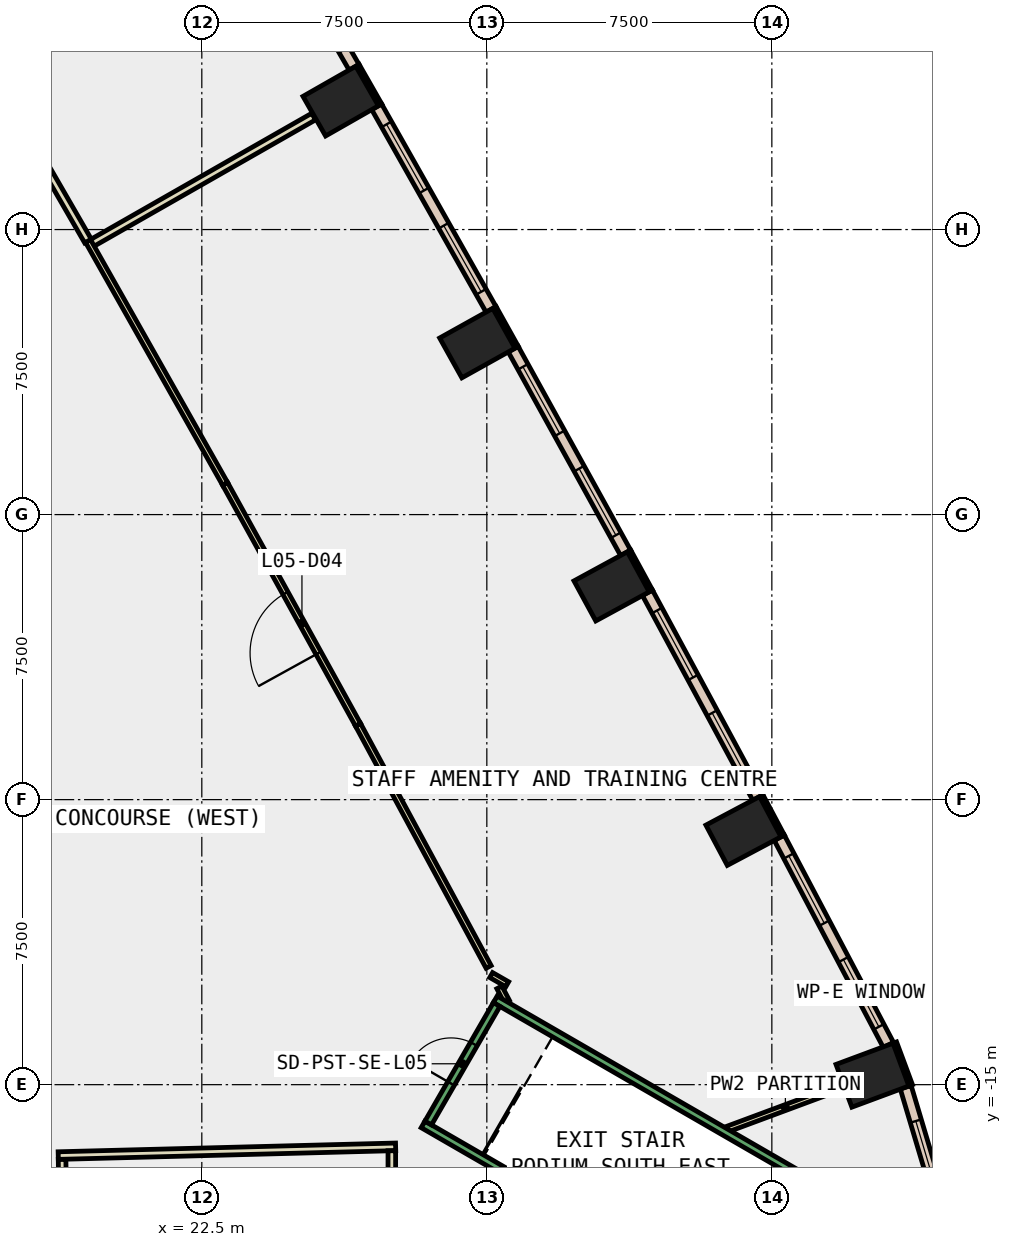
"""IFC4 building model, lengths in metres.
Left out: names, types, materials, properties, quantities, classifications, styles, units other than length and angle.
Written with IfcOpenShell. Run it as: python <this file> out.ifc"""

import sys

from ifc_helpers import new_model, si_unit, direction, frame, frame_2d, origin, origin_2d, place, context, subcontext, project, spatial, rectangle, extrude, element, fill, save


model = new_model("IFC4")
c1 = context("Model", 3, precision=1e-05, world=origin(), true_north=direction((0.0, 1.0)))
c2 = subcontext(c1, "Body", "Model", "MODEL_VIEW")
j1 = project(units=[si_unit("LENGTHUNIT", "METRE"), si_unit("PLANEANGLEUNIT", "RADIAN")], contexts=[c1])
p1 = place(None, origin())
s1 = spatial("IfcSite", under=j1, at=p1, CompositionType="ELEMENT")
p2 = place(p1, origin())
s2 = spatial("IfcBuilding", under=s1, at=p2, CompositionType="ELEMENT")
p3 = place(p2, frame((0.0, 0.0, 30.0)))
s3 = spatial("IfcBuildingStorey", under=s2, at=p3, CompositionType="ELEMENT", Elevation=30.0)
for number, where, z_axis, x_axis in (
    (1, (40.147, -14.751, -0.45), (0.0, 0.0, 1.0), (-0.348, 0.937, 0.0)),
    (2, (36.753, -8.325, -0.45), (0.0, 0.0, 1.0), (-0.469, 0.883, 0.0)),
    (3, (33.283, -1.889, -0.45), (0.0, 0.0, 1.0), (-0.478, 0.878, 0.0)),
    (4, (29.75, 4.512, -0.45), (0.0, 0.0, 1.0), (-0.487, 0.873, 0.0)),
    (5, (26.155, 10.88, -0.45), (0.0, 0.0, 1.0), (-0.496, 0.869, 0.0)),
):
    element("IfcColumn", number, at=place(p3, frame(where, z_axis=z_axis, x_axis=x_axis)), inside=s3, PredefinedType="COLUMN", context=c2, shape_type="SweptSolid", body=[
        extrude(rectangle(XDim=1.2, YDim=1.6, at=origin_2d()), origin(), (0.0, 0.0, 1.0), 4.85),
    ])
p4 = place(p3, frame((41.153, -15.018, 0.0), z_axis=(0.0, 0.0, 1.0), x_axis=(-0.348268249601, 0.937394914814, 0.0)))
e6 = element("IfcWall", 6, at=p4, inside=s3, PredefinedType="STANDARD", context=c2, shape_type="SweptSolid", body=[
    extrude(rectangle(XDim=1.2, YDim=0.1, at=frame_2d((0.6, 0.0))), origin(), (0.0, 0.0, 1.0), 4.4),
])
p5 = place(p3, frame((37.785, -8.456, 0.0), z_axis=(0.0, 0.0, 1.0), x_axis=(-0.469383408131, 0.882994459876, 0.0)))
e7 = element("IfcWall", 7, at=p5, inside=s3, PredefinedType="STANDARD", context=c2, shape_type="SweptSolid", body=[
    extrude(rectangle(XDim=1.199, YDim=0.1, at=frame_2d((0.6, 0.0))), origin(), (0.0, 0.0, 1.0), 4.4),
])
p6 = place(p3, frame((34.316, -2.01, 0.0), z_axis=(0.0, 0.0, 1.0), x_axis=(-0.478267644701, 0.878214131082, 0.0)))
e8 = element("IfcWall", 8, at=p6, inside=s3, PredefinedType="STANDARD", context=c2, shape_type="SweptSolid", body=[
    extrude(rectangle(XDim=1.2, YDim=0.1, at=frame_2d((0.6, 0.0))), origin(), (0.0, 0.0, 1.0), 4.4),
])
p7 = place(p3, frame((30.784, 4.402, 0.0), z_axis=(0.0, 0.0, 1.0), x_axis=(-0.486817526853, 0.873503689488, 0.0)))
e9 = element("IfcWall", 9, at=p7, inside=s3, PredefinedType="STANDARD", context=c2, shape_type="SweptSolid", body=[
    extrude(rectangle(XDim=1.2, YDim=0.1, at=frame_2d((0.6, 0.0))), origin(), (0.0, 0.0, 1.0), 4.4),
])
p8 = place(p3, frame((27.191, 10.78, 0.0), z_axis=(0.0, 0.0, 1.0), x_axis=(-0.495854054996, 0.868405870629, 0.0)))
e10 = element("IfcWall", 10, at=p8, inside=s3, PredefinedType="STANDARD", context=c2, shape_type="SweptSolid", body=[
    extrude(rectangle(XDim=1.2, YDim=0.1, at=frame_2d((0.6, 0.0))), origin(), (0.0, 0.0, 1.0), 4.4),
])
p9 = place(p3, frame((42.011, -18.382, 0.0), z_axis=(0.0, 0.0, 1.0), x_axis=(-0.285800575124, 0.958289116738, 0.0)))
e11 = element("IfcWall", 11, at=p9, inside=s3, PredefinedType="STANDARD", context=c2, shape_type="SweptSolid", body=[
    extrude(rectangle(XDim=3.46, YDim=0.3, at=frame_2d((1.73, 0.0))), origin(), (0.0, 0.0, 1.0), 4.4),
])
p10 = place(p9, frame((0.93, 0.0, 1.0)))
e12 = element("IfcOpeningElement", 12, at=p10, cuts=e11, PredefinedType="OPENING", context=c2, shape_type="SweptSolid", body=[
    extrude(rectangle(XDim=1.6, YDim=3.2, at=frame_2d((0.8, 1.6))), frame((0.0, 0.16, 0.0), z_axis=(0.0, -1.0, 0.0), x_axis=(1.0, 0.0, 0.0)), (0.0, 0.0, 1.0), 0.32),
])
p11 = place(p3, frame((40.568, -13.956, 0.0), z_axis=(0.0, 0.0, 1.0), x_axis=(-0.466125129602, 0.884718804792, 0.0)))
e13 = element("IfcWall", 13, at=p11, inside=s3, PredefinedType="STANDARD", context=c2, shape_type="SweptSolid", body=[
    extrude(rectangle(XDim=6.164, YDim=0.3, at=frame_2d((3.082, 0.0))), origin(), (0.0, 0.0, 1.0), 4.4),
])
p12 = place(p11, frame((0.541, 0.0, 1.0)))
e14 = element("IfcOpeningElement", 14, at=p12, cuts=e13, PredefinedType="OPENING", context=c2, shape_type="SweptSolid", body=[
    extrude(rectangle(XDim=2.0, YDim=3.2, at=frame_2d((1.0, 1.6))), frame((0.0, 0.16, 0.0), z_axis=(0.0, -1.0, 0.0), x_axis=(1.0, 0.0, 0.0)), (0.0, 0.0, 1.0), 0.32),
])
p13 = place(p11, frame((3.623, 0.0, 1.0)))
e15 = element("IfcOpeningElement", 15, at=p13, cuts=e13, PredefinedType="OPENING", context=c2, shape_type="SweptSolid", body=[
    extrude(rectangle(XDim=2.0, YDim=3.2, at=frame_2d((1.0, 1.6))), frame((0.0, 0.16, 0.0), z_axis=(0.0, -1.0, 0.0), x_axis=(1.0, 0.0, 0.0)), (0.0, 0.0, 1.0), 0.32),
])
p14 = place(p3, frame((37.131, -7.446, 0.0), z_axis=(0.0, 0.0, 1.0), x_axis=(-0.474584950749, 0.880209704856, 0.0)))
e16 = element("IfcWall", 16, at=p14, inside=s3, PredefinedType="STANDARD", context=c2, shape_type="SweptSolid", body=[
    extrude(rectangle(XDim=6.121, YDim=0.3, at=frame_2d((3.061, 0.0))), origin(), (0.0, 0.0, 1.0), 4.4),
])
p15 = place(p14, frame((0.53, 0.0, 1.0)))
e17 = element("IfcOpeningElement", 17, at=p15, cuts=e16, PredefinedType="OPENING", context=c2, shape_type="SweptSolid", body=[
    extrude(rectangle(XDim=2.0, YDim=3.2, at=frame_2d((1.0, 1.6))), frame((0.0, 0.16, 0.0), z_axis=(0.0, -1.0, 0.0), x_axis=(1.0, 0.0, 0.0)), (0.0, 0.0, 1.0), 0.32),
])
p16 = place(p14, frame((3.591, 0.0, 1.0)))
e18 = element("IfcOpeningElement", 18, at=p16, cuts=e16, PredefinedType="OPENING", context=c2, shape_type="SweptSolid", body=[
    extrude(rectangle(XDim=2.0, YDim=3.2, at=frame_2d((1.0, 1.6))), frame((0.0, 0.16, 0.0), z_axis=(0.0, -1.0, 0.0), x_axis=(1.0, 0.0, 0.0)), (0.0, 0.0, 1.0), 0.32),
])
p17 = place(p3, frame((33.652, -1.006, 0.0), z_axis=(0.0, 0.0, 1.0), x_axis=(-0.483233380559, 0.875491576152, 0.0)))
e19 = element("IfcWall", 19, at=p17, inside=s3, PredefinedType="STANDARD", context=c2, shape_type="SweptSolid", body=[
    extrude(rectangle(XDim=6.121, YDim=0.3, at=frame_2d((3.061, 0.0))), origin(), (0.0, 0.0, 1.0), 4.4),
])
p18 = place(p17, frame((0.53, 0.0, 1.0)))
e20 = element("IfcOpeningElement", 20, at=p18, cuts=e19, PredefinedType="OPENING", context=c2, shape_type="SweptSolid", body=[
    extrude(rectangle(XDim=2.0, YDim=3.2, at=frame_2d((1.0, 1.6))), frame((0.0, 0.16, 0.0), z_axis=(0.0, -1.0, 0.0), x_axis=(1.0, 0.0, 0.0)), (0.0, 0.0, 1.0), 0.32),
])
p19 = place(p17, frame((3.591, 0.0, 1.0)))
e21 = element("IfcOpeningElement", 21, at=p19, cuts=e19, PredefinedType="OPENING", context=c2, shape_type="SweptSolid", body=[
    extrude(rectangle(XDim=2.0, YDim=3.2, at=frame_2d((1.0, 1.6))), frame((0.0, 0.16, 0.0), z_axis=(0.0, -1.0, 0.0), x_axis=(1.0, 0.0, 0.0)), (0.0, 0.0, 1.0), 0.32),
])
p20 = place(p3, frame((30.111, 5.399, 0.0), z_axis=(0.0, 0.0, 1.0), x_axis=(-0.491661677717, 0.870786308267, 0.0)))
e22 = element("IfcWall", 22, at=p20, inside=s3, PredefinedType="STANDARD", context=c2, shape_type="SweptSolid", body=[
    extrude(rectangle(XDim=6.122, YDim=0.3, at=frame_2d((3.061, 0.0))), origin(), (0.0, 0.0, 1.0), 4.4),
])
p21 = place(p20, frame((0.531, 0.0, 1.0)))
e23 = element("IfcOpeningElement", 23, at=p21, cuts=e22, PredefinedType="OPENING", context=c2, shape_type="SweptSolid", body=[
    extrude(rectangle(XDim=2.0, YDim=3.2, at=frame_2d((1.0, 1.6))), frame((0.0, 0.16, 0.0), z_axis=(0.0, -1.0, 0.0), x_axis=(1.0, 0.0, 0.0)), (0.0, 0.0, 1.0), 0.32),
])
p22 = place(p20, frame((3.592, 0.0, 1.0)))
e24 = element("IfcOpeningElement", 24, at=p22, cuts=e22, PredefinedType="OPENING", context=c2, shape_type="SweptSolid", body=[
    extrude(rectangle(XDim=2.0, YDim=3.2, at=frame_2d((1.0, 1.6))), frame((0.0, 0.16, 0.0), z_axis=(0.0, -1.0, 0.0), x_axis=(1.0, 0.0, 0.0)), (0.0, 0.0, 1.0), 0.32),
])
p23 = place(p3, frame((26.507, 11.77, 0.0), z_axis=(0.0, 0.0, 1.0), x_axis=(-0.499939977436, 0.866060055055, 0.0)))
e25 = element("IfcWall", 25, at=p23, inside=s3, PredefinedType="STANDARD", context=c2, shape_type="SweptSolid", body=[
    extrude(rectangle(XDim=6.121, YDim=0.3, at=frame_2d((3.061, 0.0))), origin(), (0.0, 0.0, 1.0), 4.4),
])
p24 = place(p23, frame((0.53, 0.0, 1.0)))
e26 = element("IfcOpeningElement", 26, at=p24, cuts=e25, PredefinedType="OPENING", context=c2, shape_type="SweptSolid", body=[
    extrude(rectangle(XDim=2.0, YDim=3.2, at=frame_2d((1.0, 1.6))), frame((0.0, 0.16, 0.0), z_axis=(0.0, -1.0, 0.0), x_axis=(1.0, 0.0, 0.0)), (0.0, 0.0, 1.0), 0.32),
])
p25 = place(p23, frame((3.591, 0.0, 1.0)))
e27 = element("IfcOpeningElement", 27, at=p25, cuts=e25, PredefinedType="OPENING", context=c2, shape_type="SweptSolid", body=[
    extrude(rectangle(XDim=2.0, YDim=3.2, at=frame_2d((1.0, 1.6))), frame((0.0, 0.16, 0.0), z_axis=(0.0, -1.0, 0.0), x_axis=(1.0, 0.0, 0.0)), (0.0, 0.0, 1.0), 0.32),
])
p26 = place(p3, frame((18.834, -17.7, 0.0), z_axis=(0.0, 0.0, 1.0), x_axis=(-0.014903942317, 0.999888930083, 0.0)))
e28 = element("IfcWall", 28, at=p26, inside=s3, PredefinedType="PARTITIONING", context=c2, shape_type="SweptSolid", body=[
    extrude(rectangle(XDim=0.737, YDim=0.2, at=frame_2d((0.369, 0.0))), origin(), (0.0, 0.0, 1.0), 4.4),
])
p27 = place(p3, frame((18.722, -16.866, 0.0), z_axis=(0.0, 0.0, 1.0), x_axis=(0.999664659407, 0.025895341927, 0.0)))
e29 = element("IfcWall", 29, at=p27, inside=s3, PredefinedType="PARTITIONING", context=c2, shape_type="SweptSolid", body=[
    extrude(rectangle(XDim=8.881, YDim=0.2, at=frame_2d((4.44, 0.0))), origin(), (0.0, 0.0, 1.0), 4.4),
])
p28 = place(p3, frame((27.5, -16.739, 0.0), z_axis=(0.0, 0.0, 1.0), x_axis=(0.0, -1.0, 0.0)))
e30 = element("IfcWall", 30, at=p28, inside=s3, PredefinedType="PARTITIONING", context=c2, shape_type="SweptSolid", body=[
    extrude(rectangle(XDim=3.15, YDim=0.2, at=frame_2d((1.575, 0.0))), origin(), (0.0, 0.0, 1.0), 4.4),
])
p29 = place(p3, frame((19.554, 7.113, 0.0), z_axis=(0.0, 0.0, 1.0), x_axis=(0.868584181489, 0.495541642718, 0.0)))
e31 = element("IfcWall", 31, at=p29, inside=s3, PredefinedType="PARTITIONING", context=c2, shape_type="SweptSolid", body=[
    extrude(rectangle(XDim=6.78, YDim=0.2, at=frame_2d((3.39, 0.0))), origin(), (0.0, 0.0, 1.0), 4.4),
])
p30 = place(p3, frame((39.378, -15.037, 0.0), z_axis=(0.0, 0.0, 1.0), x_axis=(-0.937400028274, -0.348254485961, 0.0)))
e32 = element("IfcWall", 32, at=p30, inside=s3, PredefinedType="PARTITIONING", context=c2, shape_type="SweptSolid", body=[
    extrude(rectangle(XDim=3.247, YDim=0.15, at=frame_2d((1.624, 0.0))), origin(), (0.0, 0.0, 1.0), 4.4),
])
p31 = place(p3, frame((30.528, -12.816, 0.0), z_axis=(0.0, 0.0, 1.0), x_axis=(-0.465959538506, 0.884806028729, 0.0)))
e33 = element("IfcWall", 33, at=p31, inside=s3, PredefinedType="PARTITIONING", context=c2, shape_type="SweptSolid", body=[
    extrude(rectangle(XDim=0.425, YDim=0.15, at=frame_2d((0.212, 0.0))), origin(), (0.0, 0.0, 1.0), 4.4),
])
p32 = place(p3, frame((30.537, -12.358, 0.0), z_axis=(0.0, 0.0, 1.0), x_axis=(-0.86759393416, 0.497273330684, 0.0)))
e34 = element("IfcWall", 34, at=p32, inside=s3, PredefinedType="PARTITIONING", context=c2, shape_type="SweptSolid", body=[
    extrude(rectangle(XDim=0.487, YDim=0.15, at=frame_2d((0.243, 0.0))), origin(), (0.0, 0.0, 1.0), 4.4),
])
p33 = place(p3, frame((30.047, -11.901, 0.0), z_axis=(0.0, 0.0, 1.0), x_axis=(-0.474697082426, 0.88014923731, 0.0)))
e35 = element("IfcWall", 35, at=p33, inside=s3, PredefinedType="PARTITIONING", context=c2, shape_type="SweptSolid", body=[
    extrude(rectangle(XDim=7.238, YDim=0.15, at=frame_2d((3.619, 0.0))), origin(), (0.0, 0.0, 1.0), 4.4),
])
p34 = place(p3, frame((26.611, -5.53, 0.0), z_axis=(0.0, 0.0, 1.0), x_axis=(-0.483166511457, 0.875528481665, 0.0)))
e36 = element("IfcWall", 36, at=p34, inside=s3, PredefinedType="PARTITIONING", context=c2, shape_type="SweptSolid", body=[
    extrude(rectangle(XDim=7.238, YDim=0.15, at=frame_2d((3.619, 0.0))), origin(), (0.0, 0.0, 1.0), 4.4),
])
p35 = place(p34, frame((2.155, 0.0, 0.0)))
e37 = element("IfcOpeningElement", 37, at=p35, cuts=e36, PredefinedType="OPENING", context=c2, shape_type="SweptSolid", body=[
    extrude(rectangle(XDim=1.8, YDim=2.1, at=frame_2d((0.9, 1.05))), frame((0.0, 0.085, 0.0), z_axis=(0.0, -1.0, 0.0), x_axis=(1.0, 0.0, 0.0)), (0.0, 0.0, 1.0), 0.17),
])
p36 = place(p3, frame((23.114, 0.807, 0.0), z_axis=(0.0, 0.0, 1.0), x_axis=(-0.491539851918, 0.870855082075, 0.0)))
e38 = element("IfcWall", 38, at=p36, inside=s3, PredefinedType="PARTITIONING", context=c2, shape_type="SweptSolid", body=[
    extrude(rectangle(XDim=7.34, YDim=0.15, at=frame_2d((3.67, 0.0))), origin(), (0.0, 0.0, 1.0), 4.4),
])
p37 = place(p3, frame((19.505, 7.198, 0.0), z_axis=(0.0, 0.0, 1.0), x_axis=(-0.500031381659, 0.866007284817, 0.0)))
e39 = element("IfcWall", 39, at=p37, inside=s3, PredefinedType="PARTITIONING", context=c2, shape_type="SweptSolid", body=[
    extrude(rectangle(XDim=7.137, YDim=0.2, at=frame_2d((3.569, 0.0))), origin(), (0.0, 0.0, 1.0), 4.4),
])
for number, where, z_axis, x_axis in (
    (40, (28.322, -16.045, 0.0), (0.0, 0.0, 1.0), (0.866, -0.5, 0.0)),
    (41, (30.222, -12.755, 0.0), (0.0, 0.0, 1.0), (0.866, -0.5, 0.0)),
):
    element("IfcWall", number, at=place(p3, frame(where, z_axis=z_axis, x_axis=x_axis)), inside=s3, PredefinedType="STANDARD", context=c2, shape_type="SweptSolid", body=[
        extrude(rectangle(XDim=9.8, YDim=0.2, at=frame_2d((4.9, 0.0))), origin(), (0.0, 0.0, 1.0), 3.2),
    ])
p38 = place(p3, frame((28.458, -16.009, 0.0), z_axis=(0.0, 0.0, 1.0), x_axis=(0.499982693035, 0.866035395735, 0.0)))
e42 = element("IfcWall", 42, at=p38, inside=s3, PredefinedType="STANDARD", context=c2, shape_type="SweptSolid", body=[
    extrude(rectangle(XDim=3.6, YDim=0.2, at=frame_2d((1.8, 0.0))), origin(), (0.0, 0.0, 1.0), 3.2),
])
p39 = place(p38, frame((1.2, 0.0, 0.0)))
e43 = element("IfcOpeningElement", 43, at=p39, cuts=e42, PredefinedType="OPENING", context=c2, shape_type="SweptSolid", body=[
    extrude(rectangle(XDim=1.2, YDim=2.2, at=frame_2d((0.6, 1.1))), frame((0.0, 0.11, 0.0), z_axis=(0.0, -1.0, 0.0), x_axis=(1.0, 0.0, 0.0)), (0.0, 0.0, 1.0), 0.22),
])
p40 = place(p10, origin())
e44 = element("IfcWindow", 44, at=p40, inside=s3, PartitioningType="SINGLE_PANEL", PredefinedType="WINDOW", context=c2, shape_type="SweptSolid", body=[
    extrude(rectangle(XDim=1.6, YDim=3.2, at=frame_2d((0.8, 1.6))), frame((0.0, 0.03, 0.0), z_axis=(0.0, -1.0, 0.0), x_axis=(1.0, 0.0, 0.0)), (0.0, 0.0, 1.0), 0.06),
])
fill(e12, e44)
p41 = place(p12, origin())
e45 = element("IfcWindow", 45, at=p41, inside=s3, PartitioningType="SINGLE_PANEL", PredefinedType="WINDOW", context=c2, shape_type="SweptSolid", body=[
    extrude(rectangle(XDim=2.0, YDim=3.2, at=frame_2d((1.0, 1.6))), frame((0.0, 0.03, 0.0), z_axis=(0.0, -1.0, 0.0), x_axis=(1.0, 0.0, 0.0)), (0.0, 0.0, 1.0), 0.06),
])
fill(e14, e45)
p42 = place(p13, origin())
e46 = element("IfcWindow", 46, at=p42, inside=s3, PartitioningType="SINGLE_PANEL", PredefinedType="WINDOW", context=c2, shape_type="SweptSolid", body=[
    extrude(rectangle(XDim=2.0, YDim=3.2, at=frame_2d((1.0, 1.6))), frame((0.0, 0.03, 0.0), z_axis=(0.0, -1.0, 0.0), x_axis=(1.0, 0.0, 0.0)), (0.0, 0.0, 1.0), 0.06),
])
fill(e15, e46)
p43 = place(p15, origin())
e47 = element("IfcWindow", 47, at=p43, inside=s3, PartitioningType="SINGLE_PANEL", PredefinedType="WINDOW", context=c2, shape_type="SweptSolid", body=[
    extrude(rectangle(XDim=2.0, YDim=3.2, at=frame_2d((1.0, 1.6))), frame((0.0, 0.03, 0.0), z_axis=(0.0, -1.0, 0.0), x_axis=(1.0, 0.0, 0.0)), (0.0, 0.0, 1.0), 0.06),
])
fill(e17, e47)
p44 = place(p16, origin())
e48 = element("IfcWindow", 48, at=p44, inside=s3, PartitioningType="SINGLE_PANEL", PredefinedType="WINDOW", context=c2, shape_type="SweptSolid", body=[
    extrude(rectangle(XDim=2.0, YDim=3.2, at=frame_2d((1.0, 1.6))), frame((0.0, 0.03, 0.0), z_axis=(0.0, -1.0, 0.0), x_axis=(1.0, 0.0, 0.0)), (0.0, 0.0, 1.0), 0.06),
])
fill(e18, e48)
p45 = place(p18, origin())
e49 = element("IfcWindow", 49, at=p45, inside=s3, PartitioningType="SINGLE_PANEL", PredefinedType="WINDOW", context=c2, shape_type="SweptSolid", body=[
    extrude(rectangle(XDim=2.0, YDim=3.2, at=frame_2d((1.0, 1.6))), frame((0.0, 0.03, 0.0), z_axis=(0.0, -1.0, 0.0), x_axis=(1.0, 0.0, 0.0)), (0.0, 0.0, 1.0), 0.06),
])
fill(e20, e49)
p46 = place(p19, origin())
e50 = element("IfcWindow", 50, at=p46, inside=s3, PartitioningType="SINGLE_PANEL", PredefinedType="WINDOW", context=c2, shape_type="SweptSolid", body=[
    extrude(rectangle(XDim=2.0, YDim=3.2, at=frame_2d((1.0, 1.6))), frame((0.0, 0.03, 0.0), z_axis=(0.0, -1.0, 0.0), x_axis=(1.0, 0.0, 0.0)), (0.0, 0.0, 1.0), 0.06),
])
fill(e21, e50)
p47 = place(p21, origin())
e51 = element("IfcWindow", 51, at=p47, inside=s3, PartitioningType="SINGLE_PANEL", PredefinedType="WINDOW", context=c2, shape_type="SweptSolid", body=[
    extrude(rectangle(XDim=2.0, YDim=3.2, at=frame_2d((1.0, 1.6))), frame((0.0, 0.03, 0.0), z_axis=(0.0, -1.0, 0.0), x_axis=(1.0, 0.0, 0.0)), (0.0, 0.0, 1.0), 0.06),
])
fill(e23, e51)
p48 = place(p22, origin())
e52 = element("IfcWindow", 52, at=p48, inside=s3, PartitioningType="SINGLE_PANEL", PredefinedType="WINDOW", context=c2, shape_type="SweptSolid", body=[
    extrude(rectangle(XDim=2.0, YDim=3.2, at=frame_2d((1.0, 1.6))), frame((0.0, 0.03, 0.0), z_axis=(0.0, -1.0, 0.0), x_axis=(1.0, 0.0, 0.0)), (0.0, 0.0, 1.0), 0.06),
])
fill(e24, e52)
p49 = place(p35, origin())
e53 = element("IfcDoor", 53, at=p49, inside=s3, OperationType="DOUBLE_DOOR_SINGLE_SWING", PredefinedType="DOOR", context=c2, shape_type="SweptSolid", body=[
    extrude(rectangle(XDim=1.8, YDim=2.1, at=frame_2d((0.9, 1.05))), frame((0.0, 0.025, 0.0), z_axis=(0.0, -1.0, 0.0), x_axis=(1.0, 0.0, 0.0)), (0.0, 0.0, 1.0), 0.05),
])
fill(e37, e53)
p50 = place(p39, origin())
e54 = element("IfcDoor", 54, at=p50, inside=s3, OperationType="SINGLE_SWING_LEFT", PredefinedType="DOOR", context=c2, shape_type="SweptSolid", body=[
    extrude(rectangle(XDim=1.2, YDim=2.2, at=frame_2d((0.6, 1.1))), frame((0.0, 0.025, 0.0), z_axis=(0.0, -1.0, 0.0), x_axis=(1.0, 0.0, 0.0)), (0.0, 0.0, 1.0), 0.05),
])
fill(e43, e54)
save(model, sys.argv[1])
